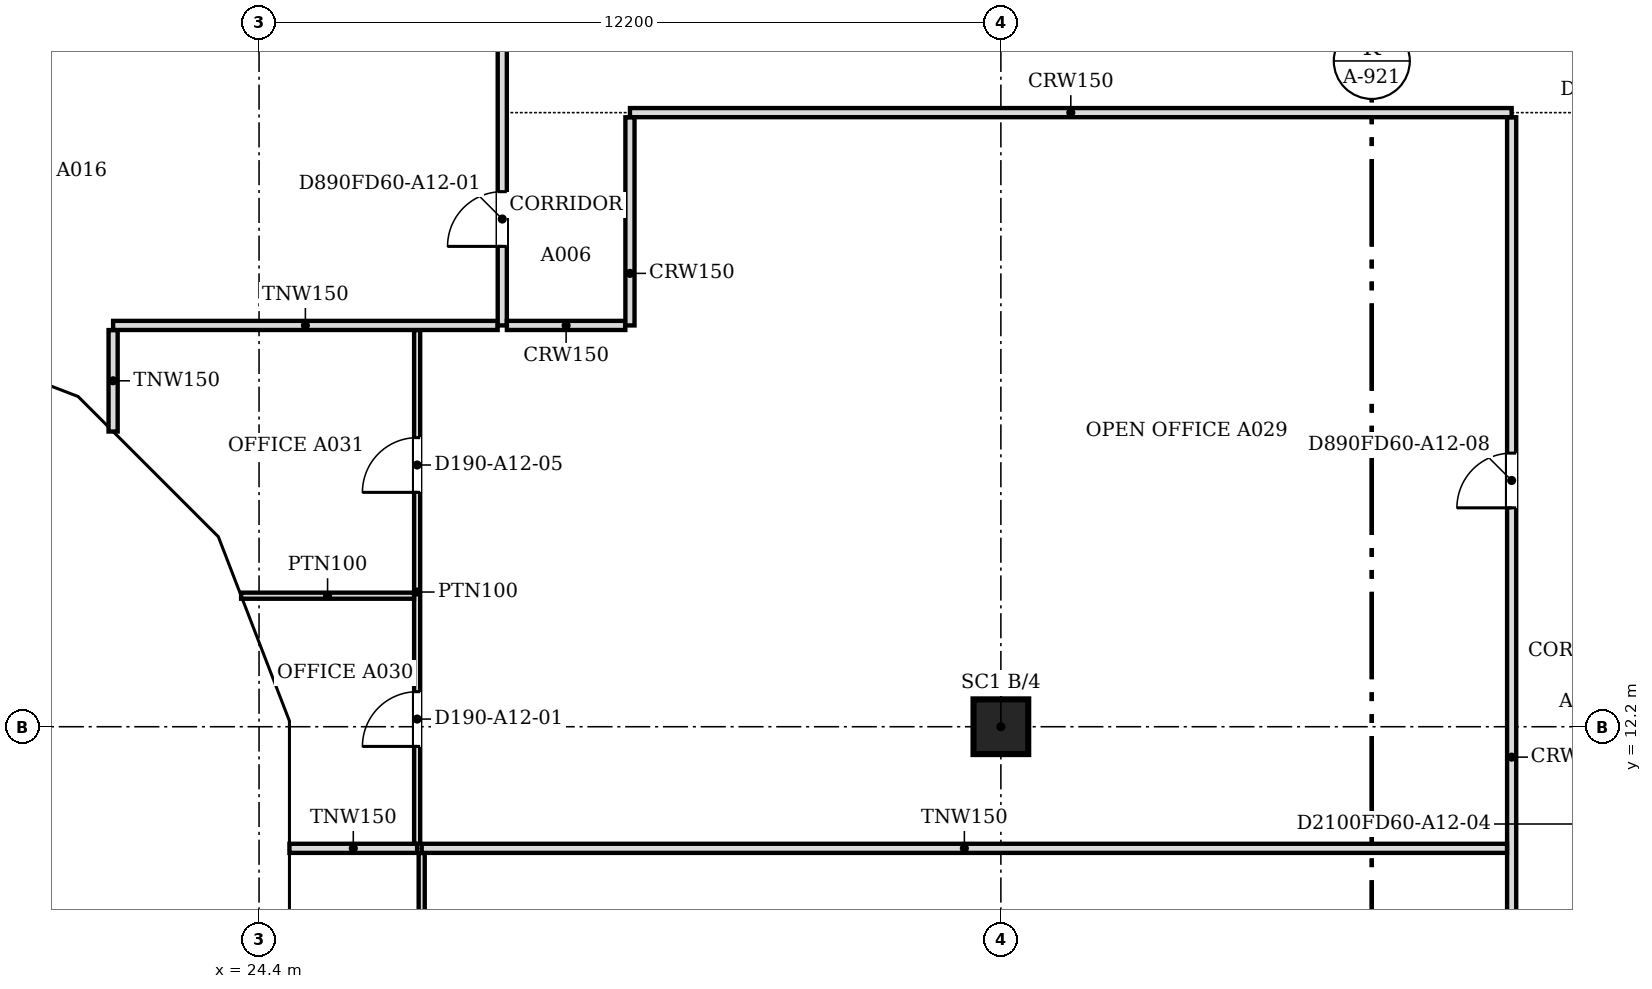
"""IFC4 building model, lengths in metres.
Left out: names, types, materials, properties, quantities, classifications, styles, units other than length and angle.
Written with IfcOpenShell. Run it as: python <this file> out.ifc"""

import sys

from ifc_helpers import new_model, si_unit, direction, frame, frame_2d, origin, origin_2d, place, context, subcontext, project, spatial, polyline, rectangle, outline, extrude, faceted_brep, source, transform, mapped, element, fill, save


model = new_model("IFC4")
c1 = context("Model", 3, precision=1e-05, world=origin(), true_north=direction((0.0, 1.0)))
c2 = subcontext(c1, "Body", "Model", "MODEL_VIEW")
j1 = project(units=[si_unit("LENGTHUNIT", "METRE"), si_unit("PLANEANGLEUNIT", "RADIAN")], contexts=[c1])
p1 = place(None, origin())
s1 = spatial("IfcSite", under=j1, at=p1, CompositionType="ELEMENT")
p2 = place(p1, origin())
s2 = spatial("IfcBuilding", under=s1, at=p2, CompositionType="ELEMENT")
p3 = place(p2, frame((0.0, 0.0, 135.4)))
s3 = spatial("IfcBuildingStorey", under=s2, at=p3, CompositionType="ELEMENT", Elevation=135.4)
p4 = place(p3, frame((36.6, 12.2, 0.0), z_axis=(0.0, 0.0, 1.0), x_axis=(1.0, 0.0, 0.0)))
e1 = element("IfcColumn", 1, at=p4, inside=s3, PredefinedType="COLUMN", context=c2, shape_type="SweptSolid", body=[
    extrude(rectangle(XDim=0.9, YDim=0.9, at=origin_2d()), origin(), (0.0, 0.0, 1.0), 3.6),
])
m1 = source(origin(), c2, "Body", "Brep", [
    faceted_brep([(0.093, -0.25, 0.056), (3.143, -0.25, 3.736), (3.143, -0.25, 3.864), (0.093, -0.25, 7.544), (0.0, 0.25, 7.543), (0.047, 0.25, 7.6), (3.196, 0.25, 3.8), (0.047, 0.25, 0.0), (0.0, 0.25, 0.057), (3.196, -0.0, 3.8), (0.047, 0.0, 0.0), (0.047, 0.0, 7.6)], [[[0, 1, 2, 3]], [[4, 5, 6, 7, 8]], [[7, 6, 9, 1, 0, 10]], [[6, 5, 11, 3, 2, 9]], [[5, 4, 11]], [[8, 7, 10]], [[8, 10, 0, 3, 11, 4]], [[1, 9, 2]]]),
])
p5 = place(p3, frame((18.303, 18.567, -3.8), z_axis=(0.0, 0.0, 1.0), x_axis=(0.932978940178, -0.359930961693, 0.0)))
e2 = element("IfcWall", 2, at=p5, inside=s3, PredefinedType="SOLIDWALL", context=c2, shape_type="MappedRepresentation", body=[
    mapped(m1, transform((0.0, 0.0, 0.0), scale=1.0)),
])
m2 = source(origin(), c2, "Body", "SweptSolid", [
    extrude(outline(polyline([(0.247, 0.633), (2.871, 3.8), (0.247, 6.967), (0.247, 0.633)])), frame((0.0, 0.26, 0.0), z_axis=(0.0, -1.0, 0.0), x_axis=(1.0, 0.0, 0.0)), (0.0, 0.0, 1.0), 0.52),
])
p6 = place(p5, origin())
e3 = element("IfcOpeningElement", 3, at=p6, cuts=e2, PredefinedType="OPENING", context=c2, shape_type="MappedRepresentation", body=[
    mapped(m2, transform((0.0, 0.0, 0.0), scale=1.0)),
])
m3 = source(origin(), c2, "Body", "Brep", [
    faceted_brep([(3.103, -0.25, 7.536), (0.053, -0.25, 3.864), (0.053, -0.25, 3.736), (3.103, -0.25, 0.064), (0.0, 0.25, 3.8), (3.156, 0.25, 7.6), (3.209, 0.25, 7.536), (3.209, 0.25, 0.064), (3.156, 0.25, 0.0), (3.156, -0.0, 0.0), (3.156, -0.0, 7.6), (0.0, 0.0, 3.8)], [[[0, 1, 2, 3]], [[4, 5, 6, 7, 8]], [[8, 7, 9]], [[6, 5, 10]], [[5, 4, 11, 1, 0, 10]], [[4, 8, 9, 3, 2, 11]], [[11, 2, 1]], [[3, 9, 7, 6, 10, 0]]]),
])
p7 = place(p3, frame((21.285, 17.417, -3.8), z_axis=(0.0, 0.0, 1.0), x_axis=(0.707106781187, -0.707106781187, 0.0)))
e4 = element("IfcWall", 4, at=p7, inside=s3, PredefinedType="SOLIDWALL", context=c2, shape_type="MappedRepresentation", body=[
    mapped(m3, transform((0.0, 0.0, 0.0), scale=1.0)),
])
m4 = source(origin(), c2, "Body", "SweptSolid", [
    extrude(outline(polyline([(2.956, 6.968), (0.325, 3.8), (2.956, 0.632), (2.956, 6.968)])), frame((0.0, 0.26, 0.0), z_axis=(0.0, -1.0, 0.0), x_axis=(1.0, 0.0, 0.0)), (0.0, 0.0, 1.0), 0.52),
])
p8 = place(p7, origin())
e5 = element("IfcOpeningElement", 5, at=p8, cuts=e4, PredefinedType="OPENING", context=c2, shape_type="MappedRepresentation", body=[
    mapped(m4, transform((0.0, 0.0, 0.0), scale=1.0)),
])
m5 = source(origin(), c2, "Body", "Brep", [
    faceted_brep([(0.106, -0.25, 0.064), (3.156, -0.25, 3.744), (3.156, -0.25, 3.856), (0.106, -0.25, 7.536), (0.0, 0.25, 7.536), (0.053, 0.25, 7.6), (3.202, 0.25, 3.8), (0.053, 0.25, 0.0), (0.0, 0.25, 0.064), (3.202, -0.0, 3.8), (0.053, 0.0, 0.0), (0.053, 0.0, 7.6)], [[[0, 1, 2, 3]], [[4, 5, 6, 7, 8]], [[7, 6, 9, 1, 0, 10]], [[6, 5, 11, 3, 2, 9]], [[5, 4, 11]], [[8, 7, 10]], [[8, 10, 0, 3, 11, 4]], [[1, 9, 2]]]),
])
p9 = place(p3, frame((23.497, 15.234, -3.8), z_axis=(0.0, 0.0, 1.0), x_axis=(0.359913782069, -0.932985567668, 0.0)))
e6 = element("IfcWall", 6, at=p9, inside=s3, PredefinedType="SOLIDWALL", context=c2, shape_type="MappedRepresentation", body=[
    mapped(m5, transform((0.0, 0.0, 0.0), scale=1.0)),
])
m6 = source(origin(), c2, "Body", "SweptSolid", [
    extrude(outline(polyline([(0.253, 0.633), (2.878, 3.8), (0.253, 6.967), (0.253, 0.633)])), frame((0.0, 0.26, 0.0), z_axis=(0.0, -1.0, 0.0), x_axis=(1.0, 0.0, 0.0)), (0.0, 0.0, 1.0), 0.52),
])
p10 = place(p9, origin())
e7 = element("IfcOpeningElement", 7, at=p10, cuts=e6, PredefinedType="OPENING", context=c2, shape_type="MappedRepresentation", body=[
    mapped(m6, transform((0.0, 0.0, 0.0), scale=1.0)),
])
m7 = source(origin(), c2, "Body", "Brep", [
    faceted_brep([(3.096, -0.25, 0.0), (6.1, -0.25, 3.8), (3.096, -0.25, 7.6), (0.047, -0.25, 3.857), (0.047, -0.25, 3.743), (0.0, 0.25, 3.8), (3.096, 0.25, 7.6), (6.053, 0.25, 3.859), (6.053, 0.25, 3.741), (3.096, 0.25, 0.0), (6.1, -0.0, 3.8), (0.0, 0.0, 3.8)], [[[0, 1, 2, 3, 4]], [[5, 6, 7, 8, 9]], [[9, 8, 10, 1, 0]], [[7, 6, 2, 1, 10]], [[6, 5, 11, 3, 2]], [[5, 9, 0, 4, 11]], [[11, 4, 3]], [[10, 8, 7]]]),
])
p11 = place(p3, frame((24.65, 12.247, -3.8), z_axis=(0.0, 0.0, 1.0), x_axis=(0.0, -1.0, 0.0)))
e8 = element("IfcWall", 8, at=p11, inside=s3, PredefinedType="SOLIDWALL", context=c2, shape_type="MappedRepresentation", body=[
    mapped(m7, transform((0.0, 0.0, 0.0), scale=1.0)),
])
m8 = source(origin(), c2, "Body", "SweptSolid", [
    extrude(outline(polyline([(3.094, 0.399), (5.781, 3.8), (3.094, 7.2), (0.323, 3.8), (3.094, 0.399)])), frame((0.0, 0.26, 0.0), z_axis=(0.0, -1.0, 0.0), x_axis=(1.0, 0.0, 0.0)), (0.0, 0.0, 1.0), 0.52),
])
p12 = place(p11, origin())
e9 = element("IfcOpeningElement", 9, at=p12, cuts=e8, PredefinedType="OPENING", context=c2, shape_type="MappedRepresentation", body=[
    mapped(m8, transform((0.0, 0.0, 0.0), scale=1.0)),
])
p13 = place(p2, frame((0.0, 0.0, 139.2)))
s4 = spatial("IfcBuildingStorey", under=s2, at=p13, CompositionType="ELEMENT", Elevation=139.2)
m9 = source(origin(), c2, "Body", "Brep", [
    faceted_brep([(3.096, -0.25, 7.536), (0.047, -0.25, 3.856), (0.047, -0.25, 3.744), (3.096, -0.25, 0.064), (0.0, 0.25, 3.8), (3.149, 0.25, 7.6), (3.202, 0.25, 7.536), (3.202, 0.25, 0.064), (3.149, 0.25, 0.0), (3.149, -0.0, 0.0), (3.149, -0.0, 7.6), (0.0, 0.0, 3.8)], [[[0, 1, 2, 3]], [[4, 5, 6, 7, 8]], [[8, 7, 9]], [[6, 5, 10]], [[5, 4, 11, 1, 0, 10]], [[4, 8, 9, 3, 2, 11]], [[11, 2, 1]], [[3, 9, 7, 6, 10, 0]]]),
])
p14 = place(p13, frame((18.346, 18.55, -3.8), z_axis=(0.0, 0.0, 1.0), x_axis=(0.932985567668, -0.359913782069, 0.0)))
e10 = element("IfcWall", 10, at=p14, inside=s4, PredefinedType="SOLIDWALL", context=c2, shape_type="MappedRepresentation", body=[
    mapped(m9, transform((0.0, 0.0, 0.0), scale=1.0)),
])
m10 = source(origin(), c2, "Body", "SweptSolid", [
    extrude(outline(polyline([(2.949, 6.967), (0.325, 3.8), (2.949, 0.633), (2.949, 6.967)])), frame((0.0, 0.26, 0.0), z_axis=(0.0, -1.0, 0.0), x_axis=(1.0, 0.0, 0.0)), (0.0, 0.0, 1.0), 0.52),
])
p15 = place(p14, origin())
e11 = element("IfcOpeningElement", 11, at=p15, cuts=e10, PredefinedType="OPENING", context=c2, shape_type="MappedRepresentation", body=[
    mapped(m10, transform((0.0, 0.0, 0.0), scale=1.0)),
])
m11 = source(origin(), c2, "Body", "Brep", [
    faceted_brep([(0.106, -0.25, 0.064), (3.156, -0.25, 3.736), (3.156, -0.25, 3.864), (0.106, -0.25, 7.536), (0.0, 0.25, 7.536), (0.053, 0.25, 7.6), (3.209, 0.25, 3.8), (0.053, 0.25, 0.0), (0.0, 0.25, 0.064), (3.209, -0.0, 3.8), (0.053, 0.0, 0.0), (0.053, 0.0, 7.6)], [[[0, 1, 2, 3]], [[4, 5, 6, 7, 8]], [[7, 6, 9, 1, 0, 10]], [[6, 5, 11, 3, 2, 9]], [[5, 4, 11]], [[8, 7, 10]], [[8, 10, 0, 3, 11, 4]], [[1, 9, 2]]]),
])
p16 = place(p13, frame((21.248, 17.454, -3.8), z_axis=(0.0, 0.0, 1.0), x_axis=(0.707106781187, -0.707106781187, 0.0)))
e12 = element("IfcWall", 12, at=p16, inside=s4, PredefinedType="SOLIDWALL", context=c2, shape_type="MappedRepresentation", body=[
    mapped(m11, transform((0.0, 0.0, 0.0), scale=1.0)),
])
m12 = source(origin(), c2, "Body", "SweptSolid", [
    extrude(outline(polyline([(0.253, 0.632), (2.884, 3.8), (0.253, 6.968), (0.253, 0.632)])), frame((0.0, 0.26, 0.0), z_axis=(0.0, -1.0, 0.0), x_axis=(1.0, 0.0, 0.0)), (0.0, 0.0, 1.0), 0.52),
])
p17 = place(p16, origin())
e13 = element("IfcOpeningElement", 13, at=p17, cuts=e12, PredefinedType="OPENING", context=c2, shape_type="MappedRepresentation", body=[
    mapped(m12, transform((0.0, 0.0, 0.0), scale=1.0)),
])
m13 = source(origin(), c2, "Body", "Brep", [
    faceted_brep([(3.103, -0.25, 7.544), (0.053, -0.25, 3.864), (0.053, -0.25, 3.736), (3.103, -0.25, 0.056), (0.0, 0.25, 3.8), (3.149, 0.25, 7.6), (3.196, 0.25, 7.543), (3.196, 0.25, 0.057), (3.149, 0.25, 0.0), (3.149, -0.0, 0.0), (3.149, -0.0, 7.6), (0.0, 0.0, 3.8)], [[[0, 1, 2, 3]], [[4, 5, 6, 7, 8]], [[8, 7, 9]], [[6, 5, 10]], [[5, 4, 11, 1, 0, 10]], [[4, 8, 9, 3, 2, 11]], [[11, 2, 1]], [[3, 9, 7, 6, 10, 0]]]),
])
p18 = place(p13, frame((23.517, 15.185, -3.8), z_axis=(0.0, 0.0, 1.0), x_axis=(0.359864468756, -0.933004589553, 0.0)))
e14 = element("IfcWall", 14, at=p18, inside=s4, PredefinedType="SOLIDWALL", context=c2, shape_type="MappedRepresentation", body=[
    mapped(m13, transform((0.0, 0.0, 0.0), scale=1.0)),
])
p19 = place(p18, origin())
e15 = element("IfcOpeningElement", 15, at=p19, cuts=e14, PredefinedType="OPENING", context=c2, shape_type="MappedRepresentation", body=[
    mapped(m10, transform((0.0, 0.0, 0.0), scale=1.0)),
])
m14 = source(origin(), c2, "Body", "Brep", [
    faceted_brep([(0.093, -0.25, 0.057), (3.143, -0.25, 3.8), (0.093, -0.25, 7.543), (0.0, 0.25, 7.544), (0.047, 0.25, 7.6), (3.143, 0.25, 3.8), (0.047, 0.25, 0.0), (0.0, 0.25, 0.056), (0.047, 0.0, 0.0), (0.047, 0.0, 7.6)], [[[0, 1, 2]], [[3, 4, 5, 6, 7]], [[6, 5, 1, 0, 8]], [[5, 4, 9, 2, 1]], [[4, 3, 9]], [[7, 6, 8]], [[7, 8, 0, 2, 9, 3]]]),
])
p20 = place(p13, frame((24.65, 12.293, -3.8), z_axis=(0.0, 0.0, 1.0), x_axis=(0.0, -1.0, 0.0)))
e16 = element("IfcWall", 16, at=p20, inside=s4, PredefinedType="SOLIDWALL", context=c2, shape_type="MappedRepresentation", body=[
    mapped(m14, transform((0.0, 0.0, 0.0), scale=1.0)),
])
m15 = source(origin(), c2, "Body", "SweptSolid", [
    extrude(outline(polyline([(0.247, 0.641), (2.821, 3.8), (0.247, 6.959), (0.247, 0.641)])), frame((0.0, 0.26, 0.0), z_axis=(0.0, -1.0, 0.0), x_axis=(1.0, 0.0, 0.0)), (0.0, 0.0, 1.0), 0.52),
])
p21 = place(p20, origin())
e17 = element("IfcOpeningElement", 17, at=p21, cuts=e16, PredefinedType="OPENING", context=c2, shape_type="MappedRepresentation", body=[
    mapped(m15, transform((0.0, 0.0, 0.0), scale=1.0)),
])
p22 = place(p3, frame((45.0, 0.5, 0.0), z_axis=(0.0, 0.0, 1.0), x_axis=(0.0, 1.0, 0.0)))
e18 = element("IfcWall", 18, at=p22, inside=s3, PredefinedType="PARTITIONING", context=c2, shape_type="SweptSolid", body=[
    extrude(rectangle(XDim=21.724, YDim=0.15, at=frame_2d((10.862, 0.0))), origin(), (0.0, 0.0, 1.0), 3.067),
])
m16 = source(origin(), c2, "Body", "SweptSolid", [
    extrude(rectangle(XDim=0.9, YDim=2.1, at=frame_2d((0.45, 1.05))), frame((0.0, 0.085, 0.0), z_axis=(0.0, -1.0, 0.0), x_axis=(1.0, 0.0, 0.0)), (0.0, 0.0, 1.0), 0.17),
])
p23 = place(p22, frame((6.2, 0.0, 0.0)))
e19 = element("IfcOpeningElement", 19, at=p23, cuts=e18, PredefinedType="OPENING", context=c2, shape_type="MappedRepresentation", body=[
    mapped(m16, transform((0.0, 0.0, 0.0), scale=1.0)),
])
p24 = place(p22, frame((15.3, 0.0, 0.0)))
e20 = element("IfcOpeningElement", 20, at=p24, cuts=e18, PredefinedType="OPENING", context=c2, shape_type="MappedRepresentation", body=[
    mapped(m16, transform((0.0, 0.0, 0.0), scale=1.0)),
])
p25 = place(p3, frame((27.075, 4.2, 0.0), z_axis=(0.0, 0.0, 1.0), x_axis=(0.0, 1.0, 0.0)))
e21 = element("IfcWall", 21, at=p25, inside=s3, PredefinedType="PARTITIONING", context=c2, shape_type="SweptSolid", body=[
    extrude(rectangle(XDim=5.924, YDim=0.1, at=frame_2d((2.962, 0.0))), origin(), (0.0, 0.0, 1.0), 3.067),
])
m17 = source(origin(), c2, "Body", "SweptSolid", [
    extrude(rectangle(XDim=0.9, YDim=2.1, at=frame_2d((0.45, 1.05))), frame((0.0, 0.06, 0.0), z_axis=(0.0, -1.0, 0.0), x_axis=(1.0, 0.0, 0.0)), (0.0, 0.0, 1.0), 0.12),
])
p26 = place(p25, frame((2.5, 0.0, 0.0)))
e22 = element("IfcOpeningElement", 22, at=p26, cuts=e21, PredefinedType="OPENING", context=c2, shape_type="MappedRepresentation", body=[
    mapped(m17, transform((0.0, 0.0, 0.0), scale=1.0)),
])
p27 = place(p3, frame((24.9, 10.2, 0.0), z_axis=(0.0, 0.0, 1.0), x_axis=(1.0, 0.0, 0.0)))
e23 = element("IfcWall", 23, at=p27, inside=s3, PredefinedType="PARTITIONING", context=c2, shape_type="SweptSolid", body=[
    extrude(rectangle(XDim=2.1, YDim=0.15, at=frame_2d((1.05, 0.0))), origin(), (0.0, 0.0, 1.0), 3.067),
])
p28 = place(p3, frame((27.075, 10.2, 0.0), z_axis=(0.0, 0.0, 1.0), x_axis=(1.0, 0.0, 0.0)))
e24 = element("IfcWall", 24, at=p28, inside=s3, PredefinedType="PARTITIONING", context=c2, shape_type="SweptSolid", body=[
    extrude(rectangle(XDim=17.849, YDim=0.15, at=frame_2d((8.925, 0.0))), origin(), (0.0, 0.0, 1.0), 3.067),
])
p29 = place(p3, frame((27.0, 10.276, 0.0), z_axis=(0.0, 0.0, 1.0), x_axis=(0.0, 1.0, 0.0)))
e25 = element("IfcWall", 25, at=p29, inside=s3, PredefinedType="PARTITIONING", context=c2, shape_type="SweptSolid", body=[
    extrude(rectangle(XDim=8.448, YDim=0.1, at=frame_2d((4.224, 0.0))), origin(), (0.0, 0.0, 1.0), 3.067),
])
p30 = place(p29, frame((1.6, 0.0, 0.0)))
e26 = element("IfcOpeningElement", 26, at=p30, cuts=e25, PredefinedType="OPENING", context=c2, shape_type="MappedRepresentation", body=[
    mapped(m17, transform((0.0, 0.0, 0.0), scale=1.0)),
])
p31 = place(p29, frame((5.779, 0.0, 0.0)))
e27 = element("IfcOpeningElement", 27, at=p31, cuts=e25, PredefinedType="OPENING", context=c2, shape_type="MappedRepresentation", body=[
    mapped(m17, transform((0.0, 0.0, 0.0), scale=1.0)),
])
p32 = place(p3, frame((24.105, 14.355, 0.0), z_axis=(0.0, 0.0, 1.0), x_axis=(1.0, 0.0, 0.0)))
e28 = element("IfcWall", 28, at=p32, inside=s3, PredefinedType="PARTITIONING", context=c2, shape_type="SweptSolid", body=[
    extrude(rectangle(XDim=2.844, YDim=0.1, at=frame_2d((1.422, 0.0))), origin(), (0.0, 0.0, 1.0), 3.067),
])
p33 = place(p3, frame((22.0, 17.055, 0.0), z_axis=(0.0, 0.0, 1.0), x_axis=(0.0, 1.0, 0.0)))
e29 = element("IfcWall", 29, at=p33, inside=s3, PredefinedType="PARTITIONING", context=c2, shape_type="SweptSolid", body=[
    extrude(rectangle(XDim=1.669, YDim=0.15, at=frame_2d((0.834, 0.0))), origin(), (0.0, 0.0, 1.0), 3.067),
])
p34 = place(p3, frame((22.0, 18.8, 0.0), z_axis=(0.0, 0.0, 1.0), x_axis=(1.0, 0.0, 0.0)))
e30 = element("IfcWall", 30, at=p34, inside=s3, PredefinedType="PARTITIONING", context=c2, shape_type="SweptSolid", body=[
    extrude(rectangle(XDim=6.324, YDim=0.15, at=frame_2d((3.162, 0.0))), origin(), (0.0, 0.0, 1.0), 3.067),
])
p35 = place(p3, frame((28.4, 18.8, 0.0), z_axis=(0.0, 0.0, 1.0), x_axis=(0.0, 1.0, 0.0)))
e31 = element("IfcWall", 31, at=p35, inside=s3, PredefinedType="PARTITIONING", context=c2, shape_type="SweptSolid", body=[
    extrude(rectangle(XDim=26.824, YDim=0.15, at=frame_2d((13.412, 0.0))), origin(), (0.0, 0.0, 1.0), 3.067),
])
p36 = place(p35, frame((1.3, 0.0, 0.0)))
e32 = element("IfcOpeningElement", 32, at=p36, cuts=e31, PredefinedType="OPENING", context=c2, shape_type="MappedRepresentation", body=[
    mapped(m16, transform((0.0, 0.0, 0.0), scale=1.0)),
])
p37 = place(p35, frame((23.351, 0.0, 0.0)))
e33 = element("IfcOpeningElement", 33, at=p37, cuts=e31, PredefinedType="OPENING", context=c2, shape_type="MappedRepresentation", body=[
    mapped(m16, transform((0.0, 0.0, 0.0), scale=1.0)),
])
p38 = place(p35, frame((17.351, 0.0, 0.0)))
e34 = element("IfcOpeningElement", 34, at=p38, cuts=e31, PredefinedType="OPENING", context=c2, shape_type="MappedRepresentation", body=[
    mapped(m16, transform((0.0, 0.0, 0.0), scale=1.0)),
])
p39 = place(p35, frame((9.7, 0.0, 0.0)))
e35 = element("IfcOpeningElement", 35, at=p39, cuts=e31, PredefinedType="OPENING", context=c2, shape_type="MappedRepresentation", body=[
    mapped(m16, transform((0.0, 0.0, 0.0), scale=1.0)),
])
p40 = place(p3, frame((28.476, 18.8, 0.0), z_axis=(0.0, 0.0, 1.0), x_axis=(1.0, 0.0, 0.0)))
e36 = element("IfcWall", 36, at=p40, inside=s3, PredefinedType="PARTITIONING", context=c2, shape_type="SweptSolid", body=[
    extrude(rectangle(XDim=1.948, YDim=0.15, at=frame_2d((0.974, 0.0))), origin(), (0.0, 0.0, 1.0), 3.067),
])
p41 = place(p3, frame((30.5, 18.8, 0.0), z_axis=(0.0, 0.0, 1.0), x_axis=(0.0, 1.0, 0.0)))
e37 = element("IfcWall", 37, at=p41, inside=s3, PredefinedType="PARTITIONING", context=c2, shape_type="SweptSolid", body=[
    extrude(rectangle(XDim=3.424, YDim=0.15, at=frame_2d((1.712, 0.0))), origin(), (0.0, 0.0, 1.0), 3.067),
])
p42 = place(p3, frame((30.5, 22.3, 0.0), z_axis=(0.0, 0.0, 1.0), x_axis=(1.0, 0.0, 0.0)))
e38 = element("IfcWall", 38, at=p42, inside=s3, PredefinedType="PARTITIONING", context=c2, shape_type="SweptSolid", body=[
    extrude(rectangle(XDim=14.5, YDim=0.15, at=frame_2d((7.25, 0.0))), origin(), (0.0, 0.0, 1.0), 3.067),
])
m18 = source(origin(), c2, "Body", "SweptSolid", [
    extrude(rectangle(XDim=0.9, YDim=2.1, at=frame_2d((0.45, 1.05))), frame((0.0, 0.025, 0.0), z_axis=(0.0, -1.0, 0.0), x_axis=(1.0, 0.0, 0.0)), (0.0, 0.0, 1.0), 0.05),
])
p43 = place(p36, origin())
e39 = element("IfcDoor", 39, at=p43, inside=s3, OperationType="SINGLE_SWING_LEFT", PredefinedType="DOOR", context=c2, shape_type="MappedRepresentation", body=[
    mapped(m18, transform((0.0, 0.0, 0.0), scale=1.0)),
])
fill(e32, e39)
p44 = place(p30, origin())
e40 = element("IfcDoor", 40, at=p44, inside=s3, OperationType="SINGLE_SWING_LEFT", PredefinedType="DOOR", context=c2, shape_type="MappedRepresentation", body=[
    mapped(m18, transform((0.0, 0.0, 0.0), scale=1.0)),
])
fill(e26, e40)
p45 = place(p31, origin())
e41 = element("IfcDoor", 41, at=p45, inside=s3, OperationType="SINGLE_SWING_LEFT", PredefinedType="DOOR", context=c2, shape_type="MappedRepresentation", body=[
    mapped(m18, transform((0.0, 0.0, 0.0), scale=1.0)),
])
fill(e27, e41)
p46 = place(p24, origin())
e42 = element("IfcDoor", 42, at=p46, inside=s3, OperationType="SINGLE_SWING_LEFT", PredefinedType="DOOR", context=c2, shape_type="MappedRepresentation", body=[
    mapped(m18, transform((0.0, 0.0, 0.0), scale=1.0)),
])
fill(e20, e42)
save(model, sys.argv[1])
